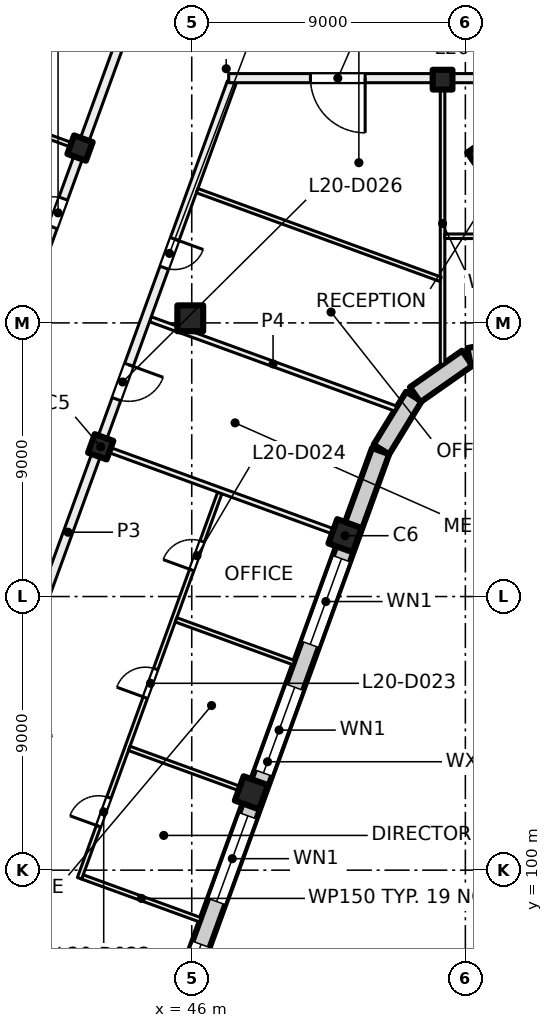
"""IFC4 building model, lengths in metres.
Left out: names, types, materials, properties, quantities, classifications, styles, units other than length and angle.
Written with IfcOpenShell. Run it as: python <this file> out.ifc"""

import sys

from ifc_helpers import new_model, si_unit, direction, frame, frame_2d, origin, origin_2d, place, context, subcontext, project, spatial, rectangle, hollow_rectangle, extrude, element, fill, save


model = new_model("IFC4")
c1 = context("Model", 3, precision=1e-05, world=origin(), true_north=direction((0.0, 1.0)))
c2 = subcontext(c1, "Body", "Model", "MODEL_VIEW")
j1 = project(units=[si_unit("LENGTHUNIT", "METRE"), si_unit("PLANEANGLEUNIT", "RADIAN")], contexts=[c1])
p1 = place(None, origin())
s1 = spatial("IfcSite", under=j1, at=p1, CompositionType="ELEMENT")
p2 = place(p1, origin())
s2 = spatial("IfcBuilding", under=s1, at=p2, CompositionType="ELEMENT")
p3 = place(p2, frame((0.0, 0.0, 89.0)))
s3 = spatial("IfcBuildingStorey", under=s2, at=p3, CompositionType="ELEMENT", Elevation=89.0)
p4 = place(p3, frame((56.036, 123.43, 0.0), z_axis=(0.0, 0.0, 1.0), x_axis=(0.573576436351, -0.819152044289, 0.0)))
e1 = element("IfcColumn", 1, at=p4, inside=s3, PredefinedType="COLUMN", context=c2, shape_type="SweptSolid", body=[
    extrude(hollow_rectangle(XDim=1.4, YDim=1.4, WallThickness=0.04, at=origin_2d()), origin(), (0.0, 0.0, 1.0), 4.0),
])
p5 = place(p3, frame((54.25, 126.0, 0.0), z_axis=(0.0, 0.0, 1.0), x_axis=(1.0, 0.0, 0.0)))
e2 = element("IfcColumn", 2, at=p5, inside=s3, PredefinedType="COLUMN", context=c2, shape_type="SweptSolid", body=[
    extrude(rectangle(XDim=0.65, YDim=0.65, at=origin_2d()), origin(), (0.0, 0.0, 1.0), 4.0),
])
p6 = place(p3, frame((45.952, 118.152, 0.0), z_axis=(0.0, 0.0, 1.0), x_axis=(1.0, 0.0, 0.0)))
e3 = element("IfcColumn", 3, at=p6, inside=s3, PredefinedType="COLUMN", context=c2, shape_type="SweptSolid", body=[
    extrude(rectangle(XDim=0.85, YDim=0.85, at=origin_2d()), origin(), (0.0, 0.0, 1.0), 4.0),
])
for number, where, z_axis, x_axis in (
    (4, (43.006, 113.925, 0.0), (0.0, 0.0, 1.0), (-0.342, -0.94, 0.0)),
    (5, (42.325, 123.751, 0.0), (0.0, 0.0, 1.0), (-0.342, -0.94, 0.0)),
):
    element("IfcColumn", number, at=place(p3, frame(where, z_axis=z_axis, x_axis=x_axis)), inside=s3, PredefinedType="COLUMN", context=c2, shape_type="SweptSolid", body=[
        extrude(rectangle(XDim=0.65, YDim=0.65, at=origin_2d()), origin(), (0.0, 0.0, 1.0), 4.0),
    ])
for number, where, z_axis, x_axis in (
    (6, (51.04, 111.001, 0.0), (0.0, 0.0, 1.0), (-0.342, -0.94, 0.0)),
    (7, (47.962, 102.544, 0.0), (0.0, 0.0, 1.0), (-0.342, -0.94, 0.0)),
):
    element("IfcColumn", number, at=place(p3, frame(where, z_axis=z_axis, x_axis=x_axis)), inside=s3, PredefinedType="COLUMN", context=c2, shape_type="SweptSolid", body=[
        extrude(rectangle(XDim=0.85, YDim=0.85, at=origin_2d()), origin(), (0.0, 0.0, 1.0), 4.0),
    ])
p7 = place(p3, frame((52.212, 113.783, 0.0), z_axis=(0.0, 0.0, 1.0), x_axis=(-0.34202521188, -0.939690775968, 0.0)))
e8 = element("IfcWall", 8, at=p7, inside=s3, PredefinedType="SOLIDWALL", context=c2, shape_type="SweptSolid", body=[
    extrude(rectangle(XDim=21.745, YDim=0.6, at=frame_2d((10.873, 0.0))), origin(), (0.0, 0.0, 1.0), 3.625),
])
p8 = place(p7, frame((3.765, 0.0, 0.9)))
e9 = element("IfcOpeningElement", 9, at=p8, cuts=e8, PredefinedType="OPENING", context=c2, shape_type="SweptSolid", body=[
    extrude(rectangle(XDim=3.0, YDim=2.4, at=frame_2d((1.5, 1.2))), frame((0.0, 0.31, 0.0), z_axis=(0.0, -1.0, 0.0), x_axis=(1.0, 0.0, 0.0)), (0.0, 0.0, 1.0), 0.62),
])
p9 = place(p7, frame((8.265, 0.0, 0.9)))
e10 = element("IfcOpeningElement", 10, at=p9, cuts=e8, PredefinedType="OPENING", context=c2, shape_type="SweptSolid", body=[
    extrude(rectangle(XDim=3.0, YDim=2.4, at=frame_2d((1.5, 1.2))), frame((0.0, 0.31, 0.0), z_axis=(0.0, -1.0, 0.0), x_axis=(1.0, 0.0, 0.0)), (0.0, 0.0, 1.0), 0.62),
])
p10 = place(p7, frame((12.765, 0.0, 0.9)))
e11 = element("IfcOpeningElement", 11, at=p10, cuts=e8, PredefinedType="OPENING", context=c2, shape_type="SweptSolid", body=[
    extrude(rectangle(XDim=3.0, YDim=2.4, at=frame_2d((1.5, 1.2))), frame((0.0, 0.31, 0.0), z_axis=(0.0, -1.0, 0.0), x_axis=(1.0, 0.0, 0.0)), (0.0, 0.0, 1.0), 0.62),
])
p11 = place(p7, frame((17.265, 0.0, 0.9)))
e12 = element("IfcOpeningElement", 12, at=p11, cuts=e8, PredefinedType="OPENING", context=c2, shape_type="SweptSolid", body=[
    extrude(rectangle(XDim=3.0, YDim=2.4, at=frame_2d((1.5, 1.2))), frame((0.0, 0.31, 0.0), z_axis=(0.0, -1.0, 0.0), x_axis=(1.0, 0.0, 0.0)), (0.0, 0.0, 1.0), 0.62),
])
p12 = place(p3, frame((53.305, 115.578, 0.0), z_axis=(0.0, 0.0, 1.0), x_axis=(-0.522402266438, -0.852699168535, 0.0)))
e13 = element("IfcWall", 13, at=p12, inside=s3, PredefinedType="SOLIDWALL", context=c2, shape_type="SweptSolid", body=[
    extrude(rectangle(XDim=2.042, YDim=0.6, at=frame_2d((1.021, 0.0))), origin(), (0.0, 0.0, 1.0), 3.625),
])
for number, where, z_axis, x_axis in (
    (14, (55.062, 116.839, 0.0), (0.0, 0.0, 1.0), (-0.819, -0.574, 0.0)),
    (15, (57.175, 117.294, 0.0), (0.0, 0.0, 1.0), (-0.98, -0.199, 0.0)),
):
    element("IfcWall", number, at=place(p3, frame(where, z_axis=z_axis, x_axis=x_axis)), inside=s3, PredefinedType="SOLIDWALL", context=c2, shape_type="SweptSolid", body=[
        extrude(rectangle(XDim=2.092, YDim=0.6, at=frame_2d((1.046, 0.0))), origin(), (0.0, 0.0, 1.0), 3.625),
    ])
p13 = place(p3, frame((32.881, 97.657, 0.0), z_axis=(0.0, 0.0, 1.0), x_axis=(0.342017360004, 0.939693633828, 0.0)))
e16 = element("IfcWall", 16, at=p13, inside=s3, PredefinedType="PARTITIONING", context=c2, shape_type="SweptSolid", body=[
    extrude(rectangle(XDim=34.516, YDim=0.3, at=frame_2d((17.258, 0.0))), origin(), (0.0, 0.0, 1.0), 3.625),
])
p14 = place(p13, frame((4.275, 0.0, 0.0)))
e17 = element("IfcOpeningElement", 17, at=p14, cuts=e16, PredefinedType="OPENING", context=c2, shape_type="SweptSolid", body=[
    extrude(rectangle(XDim=1.2, YDim=2.1, at=frame_2d((0.6, 1.05))), frame((0.0, 0.16, 0.0), z_axis=(0.0, -1.0, 0.0), x_axis=(1.0, 0.0, 0.0)), (0.0, 0.0, 1.0), 0.32),
])
p15 = place(p13, frame((10.75, 0.0, 0.0)))
e18 = element("IfcOpeningElement", 18, at=p15, cuts=e16, PredefinedType="OPENING", context=c2, shape_type="SweptSolid", body=[
    extrude(rectangle(XDim=1.0, YDim=2.1, at=frame_2d((0.5, 1.05))), frame((0.0, 0.16, 0.0), z_axis=(0.0, -1.0, 0.0), x_axis=(1.0, 0.0, 0.0)), (0.0, 0.0, 1.0), 0.32),
])
p16 = place(p13, frame((15.25, 0.0, 0.0)))
e19 = element("IfcOpeningElement", 19, at=p16, cuts=e16, PredefinedType="OPENING", context=c2, shape_type="SweptSolid", body=[
    extrude(rectangle(XDim=1.0, YDim=2.1, at=frame_2d((0.5, 1.05))), frame((0.0, 0.16, 0.0), z_axis=(0.0, -1.0, 0.0), x_axis=(1.0, 0.0, 0.0)), (0.0, 0.0, 1.0), 0.32),
])
p17 = place(p13, frame((20.4, 0.0, 0.0)))
e20 = element("IfcOpeningElement", 20, at=p17, cuts=e16, PredefinedType="OPENING", context=c2, shape_type="SweptSolid", body=[
    extrude(rectangle(XDim=1.2, YDim=2.1, at=frame_2d((0.6, 1.05))), frame((0.0, 0.16, 0.0), z_axis=(0.0, -1.0, 0.0), x_axis=(1.0, 0.0, 0.0)), (0.0, 0.0, 1.0), 0.32),
])
p18 = place(p13, frame((25.0, 0.0, 0.0)))
e21 = element("IfcOpeningElement", 21, at=p18, cuts=e16, PredefinedType="OPENING", context=c2, shape_type="SweptSolid", body=[
    extrude(rectangle(XDim=1.0, YDim=2.1, at=frame_2d((0.5, 1.05))), frame((0.0, 0.16, 0.0), z_axis=(0.0, -1.0, 0.0), x_axis=(1.0, 0.0, 0.0)), (0.0, 0.0, 1.0), 0.32),
])
p19 = place(p3, frame((46.282, 98.367, 0.0), z_axis=(0.0, 0.0, 1.0), x_axis=(-0.939765774653, 0.341819087808, 0.0)))
e22 = element("IfcWall", 22, at=p19, inside=s3, PredefinedType="PARTITIONING", context=c2, shape_type="SweptSolid", body=[
    extrude(rectangle(XDim=4.125, YDim=0.15, at=frame_2d((2.063, 0.0))), origin(), (0.0, 0.0, 1.0), 3.625),
])
p20 = place(p3, frame((42.309, 99.733, 0.0), z_axis=(0.0, 0.0, 1.0), x_axis=(0.342023551531, 0.939691380293, 0.0)))
e23 = element("IfcWall", 23, at=p20, inside=s3, PredefinedType="PARTITIONING", context=c2, shape_type="SweptSolid", body=[
    extrude(rectangle(XDim=13.488, YDim=0.15, at=frame_2d((6.744, 0.0))), origin(), (0.0, 0.0, 1.0), 3.625),
])
p21 = place(p20, frame((1.825, 0.0, 0.0)))
e24 = element("IfcOpeningElement", 24, at=p21, cuts=e23, PredefinedType="OPENING", context=c2, shape_type="SweptSolid", body=[
    extrude(rectangle(XDim=1.0, YDim=2.1, at=frame_2d((0.5, 1.05))), frame((0.0, 0.085, 0.0), z_axis=(0.0, -1.0, 0.0), x_axis=(1.0, 0.0, 0.0)), (0.0, 0.0, 1.0), 0.17),
])
p22 = place(p20, frame((6.325, 0.0, 0.0)))
e25 = element("IfcOpeningElement", 25, at=p22, cuts=e23, PredefinedType="OPENING", context=c2, shape_type="SweptSolid", body=[
    extrude(rectangle(XDim=1.0, YDim=2.1, at=frame_2d((0.5, 1.05))), frame((0.0, 0.085, 0.0), z_axis=(0.0, -1.0, 0.0), x_axis=(1.0, 0.0, 0.0)), (0.0, 0.0, 1.0), 0.17),
])
p23 = place(p20, frame((10.791, 0.0, 0.0)))
e26 = element("IfcOpeningElement", 26, at=p23, cuts=e23, PredefinedType="OPENING", context=c2, shape_type="SweptSolid", body=[
    extrude(rectangle(XDim=1.0, YDim=2.1, at=frame_2d((0.5, 1.05))), frame((0.0, 0.085, 0.0), z_axis=(0.0, -1.0, 0.0), x_axis=(1.0, 0.0, 0.0)), (0.0, 0.0, 1.0), 0.17),
])
p24 = place(p3, frame((42.231, 123.785, 0.0), z_axis=(0.0, 0.0, 1.0), x_axis=(-0.939687752599, 0.342033518263, 0.0)))
e27 = element("IfcWall", 27, at=p24, inside=s3, PredefinedType="PARTITIONING", context=c2, shape_type="SweptSolid", body=[
    extrude(rectangle(XDim=8.301, YDim=0.15, at=frame_2d((4.15, 0.0))), origin(), (0.0, 0.0, 1.0), 3.625),
])
p25 = place(p3, frame((43.1, 113.891, 0.0), z_axis=(0.0, 0.0, 1.0), x_axis=(0.939670544866, -0.342080790328, 0.0)))
e28 = element("IfcWall", 28, at=p25, inside=s3, PredefinedType="PARTITIONING", context=c2, shape_type="SweptSolid", body=[
    extrude(rectangle(XDim=8.3, YDim=0.175, at=frame_2d((4.15, 0.0))), origin(), (0.0, 0.0, 1.0), 3.625),
])
p26 = place(p3, frame((43.944, 104.006, 0.0), z_axis=(0.0, 0.0, 1.0), x_axis=(0.939689717042, -0.34202812119, 0.0)))
e29 = element("IfcWall", 29, at=p26, inside=s3, PredefinedType="PARTITIONING", context=c2, shape_type="SweptSolid", body=[
    extrude(rectangle(XDim=4.126, YDim=0.15, at=frame_2d((2.063, 0.0))), origin(), (0.0, 0.0, 1.0), 3.625),
])
p27 = place(p3, frame((44.639, 118.12, 0.0), z_axis=(0.0, 0.0, 1.0), x_axis=(0.939669707102, -0.342083091593, 0.0)))
e30 = element("IfcWall", 30, at=p27, inside=s3, PredefinedType="PARTITIONING", context=c2, shape_type="SweptSolid", body=[
    extrude(rectangle(XDim=8.589, YDim=0.175, at=frame_2d((4.295, 0.0))), origin(), (0.0, 0.0, 1.0), 3.625),
])
p28 = place(p3, frame((45.483, 108.234, 0.0), z_axis=(0.0, 0.0, 1.0), x_axis=(0.939791695678, -0.341747814529, 0.0)))
e31 = element("IfcWall", 31, at=p28, inside=s3, PredefinedType="PARTITIONING", context=c2, shape_type="SweptSolid", body=[
    extrude(rectangle(XDim=4.125, YDim=0.15, at=frame_2d((2.063, 0.0))), origin(), (0.0, 0.0, 1.0), 3.625),
])
p29 = place(p3, frame((47.314, 125.909, 0.0), z_axis=(0.0, 0.0, 1.0), x_axis=(-0.342010770371, -0.939696032209, 0.0)))
e32 = element("IfcWall", 32, at=p29, inside=s3, PredefinedType="PARTITIONING", context=c2, shape_type="SweptSolid", body=[
    extrude(rectangle(XDim=31.485, YDim=0.3, at=frame_2d((15.742, 0.0))), origin(), (0.0, 0.0, 1.0), 3.625),
])
p30 = place(p29, frame((22.21, 0.0, 0.0)))
e33 = element("IfcOpeningElement", 33, at=p30, cuts=e32, PredefinedType="OPENING", context=c2, shape_type="SweptSolid", body=[
    extrude(rectangle(XDim=1.8, YDim=2.1, at=frame_2d((0.9, 1.05))), frame((0.0, 0.16, 0.0), z_axis=(0.0, -1.0, 0.0), x_axis=(1.0, 0.0, 0.0)), (0.0, 0.0, 1.0), 0.32),
])
p31 = place(p29, frame((9.885, 0.0, 0.0)))
e34 = element("IfcOpeningElement", 34, at=p31, cuts=e32, PredefinedType="OPENING", context=c2, shape_type="SweptSolid", body=[
    extrude(rectangle(XDim=1.2, YDim=2.1, at=frame_2d((0.6, 1.05))), frame((0.0, 0.16, 0.0), z_axis=(0.0, -1.0, 0.0), x_axis=(1.0, 0.0, 0.0)), (0.0, 0.0, 1.0), 0.32),
])
p32 = place(p29, frame((5.484, 0.0, 0.0)))
e35 = element("IfcOpeningElement", 35, at=p32, cuts=e32, PredefinedType="OPENING", context=c2, shape_type="SweptSolid", body=[
    extrude(rectangle(XDim=1.0, YDim=2.1, at=frame_2d((0.5, 1.05))), frame((0.0, 0.16, 0.0), z_axis=(0.0, -1.0, 0.0), x_axis=(1.0, 0.0, 0.0)), (0.0, 0.0, 1.0), 0.32),
])
p33 = place(p3, frame((54.25, 116.637, 0.0), z_axis=(0.0, 0.0, 1.0), x_axis=(0.0, 1.0, 0.0)))
e36 = element("IfcWall", 36, at=p33, inside=s3, PredefinedType="PARTITIONING", context=c2, shape_type="SweptSolid", body=[
    extrude(rectangle(XDim=9.263, YDim=0.15, at=frame_2d((4.631, 0.0))), origin(), (0.0, 0.0, 1.0), 3.625),
])
p34 = place(p3, frame((54.18, 119.436, 0.0), z_axis=(0.0, 0.0, 1.0), x_axis=(-0.939669476286, 0.342083725624, 0.0)))
e37 = element("IfcWall", 37, at=p34, inside=s3, PredefinedType="PARTITIONING", context=c2, shape_type="SweptSolid", body=[
    extrude(rectangle(XDim=8.516, YDim=0.15, at=frame_2d((4.258, 0.0))), origin(), (0.0, 0.0, 1.0), 3.625),
])
p35 = place(p3, frame((54.325, 120.85, 0.0), z_axis=(0.0, 0.0, 1.0), x_axis=(1.0, 0.0, 0.0)))
e38 = element("IfcWall", 38, at=p35, inside=s3, PredefinedType="PARTITIONING", context=c2, shape_type="SweptSolid", body=[
    extrude(rectangle(XDim=4.35, YDim=0.15, at=frame_2d((2.175, 0.0))), origin(), (0.0, 0.0, 1.0), 3.625),
])
p36 = place(p3, frame((91.0, 126.05, 0.0), z_axis=(0.0, 0.0, 1.0), x_axis=(-1.0, 0.0, 0.0)))
e39 = element("IfcWall", 39, at=p36, inside=s3, PredefinedType="PARTITIONING", context=c2, shape_type="SweptSolid", body=[
    extrude(rectangle(XDim=43.785, YDim=0.3, at=frame_2d((21.893, 0.0))), origin(), (0.0, 0.0, 1.0), 3.625),
])
p37 = place(p36, frame((2.025, 0.0, 0.0)))
e40 = element("IfcOpeningElement", 40, at=p37, cuts=e39, PredefinedType="OPENING", context=c2, shape_type="SweptSolid", body=[
    extrude(rectangle(XDim=1.2, YDim=2.1, at=frame_2d((0.6, 1.05))), frame((0.0, 0.16, 0.0), z_axis=(0.0, -1.0, 0.0), x_axis=(1.0, 0.0, 0.0)), (0.0, 0.0, 1.0), 0.32),
])
p38 = place(p36, frame((6.9, 0.0, 0.0)))
e41 = element("IfcOpeningElement", 41, at=p38, cuts=e39, PredefinedType="OPENING", context=c2, shape_type="SweptSolid", body=[
    extrude(rectangle(XDim=1.2, YDim=2.1, at=frame_2d((0.6, 1.05))), frame((0.0, 0.16, 0.0), z_axis=(0.0, -1.0, 0.0), x_axis=(1.0, 0.0, 0.0)), (0.0, 0.0, 1.0), 0.32),
])
p39 = place(p36, frame((11.4, 0.0, 0.0)))
e42 = element("IfcOpeningElement", 42, at=p39, cuts=e39, PredefinedType="OPENING", context=c2, shape_type="SweptSolid", body=[
    extrude(rectangle(XDim=1.2, YDim=2.1, at=frame_2d((0.6, 1.05))), frame((0.0, 0.16, 0.0), z_axis=(0.0, -1.0, 0.0), x_axis=(1.0, 0.0, 0.0)), (0.0, 0.0, 1.0), 0.32),
])
p40 = place(p36, frame((15.25, 0.0, 0.0)))
e43 = element("IfcOpeningElement", 43, at=p40, cuts=e39, PredefinedType="OPENING", context=c2, shape_type="SweptSolid", body=[
    extrude(rectangle(XDim=1.0, YDim=2.1, at=frame_2d((0.5, 1.05))), frame((0.0, 0.16, 0.0), z_axis=(0.0, -1.0, 0.0), x_axis=(1.0, 0.0, 0.0)), (0.0, 0.0, 1.0), 0.32),
])
p41 = place(p36, frame((19.9, 0.0, 0.0)))
e44 = element("IfcOpeningElement", 44, at=p41, cuts=e39, PredefinedType="OPENING", context=c2, shape_type="SweptSolid", body=[
    extrude(rectangle(XDim=1.2, YDim=2.1, at=frame_2d((0.6, 1.05))), frame((0.0, 0.16, 0.0), z_axis=(0.0, -1.0, 0.0), x_axis=(1.0, 0.0, 0.0)), (0.0, 0.0, 1.0), 0.32),
])
p42 = place(p36, frame((23.85, 0.0, 0.0)))
e45 = element("IfcOpeningElement", 45, at=p42, cuts=e39, PredefinedType="OPENING", context=c2, shape_type="SweptSolid", body=[
    extrude(rectangle(XDim=1.8, YDim=2.1, at=frame_2d((0.9, 1.05))), frame((0.0, 0.16, 0.0), z_axis=(0.0, -1.0, 0.0), x_axis=(1.0, 0.0, 0.0)), (0.0, 0.0, 1.0), 0.32),
])
p43 = place(p36, frame((34.0, 0.0, 0.0)))
e46 = element("IfcOpeningElement", 46, at=p43, cuts=e39, PredefinedType="OPENING", context=c2, shape_type="SweptSolid", body=[
    extrude(rectangle(XDim=1.0, YDim=2.1, at=frame_2d((0.5, 1.05))), frame((0.0, 0.16, 0.0), z_axis=(0.0, -1.0, 0.0), x_axis=(1.0, 0.0, 0.0)), (0.0, 0.0, 1.0), 0.32),
])
p44 = place(p36, frame((39.296, 0.0, 0.0)))
e47 = element("IfcOpeningElement", 47, at=p44, cuts=e39, PredefinedType="OPENING", context=c2, shape_type="SweptSolid", body=[
    extrude(rectangle(XDim=1.8, YDim=2.1, at=frame_2d((0.9, 1.05))), frame((0.0, 0.16, 0.0), z_axis=(0.0, -1.0, 0.0), x_axis=(1.0, 0.0, 0.0)), (0.0, 0.0, 1.0), 0.32),
])
p45 = place(p8, origin())
e48 = element("IfcWindow", 48, at=p45, inside=s3, PartitioningType="SINGLE_PANEL", PredefinedType="WINDOW", context=c2, shape_type="SweptSolid", body=[
    extrude(rectangle(XDim=3.0, YDim=2.4, at=frame_2d((1.5, 1.2))), frame((0.0, 0.03, 0.0), z_axis=(0.0, -1.0, 0.0), x_axis=(1.0, 0.0, 0.0)), (0.0, 0.0, 1.0), 0.06),
])
fill(e9, e48)
p46 = place(p9, origin())
e49 = element("IfcWindow", 49, at=p46, inside=s3, PartitioningType="SINGLE_PANEL", PredefinedType="WINDOW", context=c2, shape_type="SweptSolid", body=[
    extrude(rectangle(XDim=3.0, YDim=2.4, at=frame_2d((1.5, 1.2))), frame((0.0, 0.03, 0.0), z_axis=(0.0, -1.0, 0.0), x_axis=(1.0, 0.0, 0.0)), (0.0, 0.0, 1.0), 0.06),
])
fill(e10, e49)
p47 = place(p10, origin())
e50 = element("IfcWindow", 50, at=p47, inside=s3, PartitioningType="SINGLE_PANEL", PredefinedType="WINDOW", context=c2, shape_type="SweptSolid", body=[
    extrude(rectangle(XDim=3.0, YDim=2.4, at=frame_2d((1.5, 1.2))), frame((0.0, 0.03, 0.0), z_axis=(0.0, -1.0, 0.0), x_axis=(1.0, 0.0, 0.0)), (0.0, 0.0, 1.0), 0.06),
])
fill(e11, e50)
p48 = place(p11, origin())
e51 = element("IfcWindow", 51, at=p48, inside=s3, PartitioningType="SINGLE_PANEL", PredefinedType="WINDOW", context=c2, shape_type="SweptSolid", body=[
    extrude(rectangle(XDim=3.0, YDim=2.4, at=frame_2d((1.5, 1.2))), frame((0.0, 0.03, 0.0), z_axis=(0.0, -1.0, 0.0), x_axis=(1.0, 0.0, 0.0)), (0.0, 0.0, 1.0), 0.06),
])
fill(e12, e51)
p49 = place(p18, origin())
e52 = element("IfcDoor", 52, at=p49, inside=s3, OperationType="SINGLE_SWING_RIGHT", PredefinedType="DOOR", context=c2, shape_type="SweptSolid", body=[
    extrude(rectangle(XDim=1.0, YDim=2.1, at=frame_2d((0.5, 1.05))), frame((0.0, 0.025, 0.0), z_axis=(0.0, -1.0, 0.0), x_axis=(1.0, 0.0, 0.0)), (0.0, 0.0, 1.0), 0.05),
])
fill(e21, e52)
p50 = place(p21, origin())
e53 = element("IfcDoor", 53, at=p50, inside=s3, OperationType="SINGLE_SWING_LEFT", PredefinedType="DOOR", context=c2, shape_type="SweptSolid", body=[
    extrude(rectangle(XDim=1.0, YDim=2.1, at=frame_2d((0.5, 1.05))), frame((0.0, 0.025, 0.0), z_axis=(0.0, -1.0, 0.0), x_axis=(1.0, 0.0, 0.0)), (0.0, 0.0, 1.0), 0.05),
])
fill(e24, e53)
p51 = place(p22, origin())
e54 = element("IfcDoor", 54, at=p51, inside=s3, OperationType="SINGLE_SWING_LEFT", PredefinedType="DOOR", context=c2, shape_type="SweptSolid", body=[
    extrude(rectangle(XDim=1.0, YDim=2.1, at=frame_2d((0.5, 1.05))), frame((0.0, 0.025, 0.0), z_axis=(0.0, -1.0, 0.0), x_axis=(1.0, 0.0, 0.0)), (0.0, 0.0, 1.0), 0.05),
])
fill(e25, e54)
p52 = place(p23, origin())
e55 = element("IfcDoor", 55, at=p52, inside=s3, OperationType="SINGLE_SWING_LEFT", PredefinedType="DOOR", context=c2, shape_type="SweptSolid", body=[
    extrude(rectangle(XDim=1.0, YDim=2.1, at=frame_2d((0.5, 1.05))), frame((0.0, 0.025, 0.0), z_axis=(0.0, -1.0, 0.0), x_axis=(1.0, 0.0, 0.0)), (0.0, 0.0, 1.0), 0.05),
])
fill(e26, e55)
p53 = place(p31, origin())
e56 = element("IfcDoor", 56, at=p53, inside=s3, OperationType="DOUBLE_DOOR_SINGLE_SWING", PredefinedType="DOOR", context=c2, shape_type="SweptSolid", body=[
    extrude(rectangle(XDim=1.2, YDim=2.1, at=frame_2d((0.6, 1.05))), frame((0.0, 0.025, 0.0), z_axis=(0.0, -1.0, 0.0), x_axis=(1.0, 0.0, 0.0)), (0.0, 0.0, 1.0), 0.05),
])
fill(e34, e56)
p54 = place(p32, origin())
e57 = element("IfcDoor", 57, at=p54, inside=s3, OperationType="SINGLE_SWING_LEFT", PredefinedType="DOOR", context=c2, shape_type="SweptSolid", body=[
    extrude(rectangle(XDim=1.0, YDim=2.1, at=frame_2d((0.5, 1.05))), frame((0.0, 0.025, 0.0), z_axis=(0.0, -1.0, 0.0), x_axis=(1.0, 0.0, 0.0)), (0.0, 0.0, 1.0), 0.05),
])
fill(e35, e57)
p55 = place(p44, origin())
e58 = element("IfcDoor", 58, at=p55, inside=s3, OperationType="DOUBLE_DOOR_SINGLE_SWING", PredefinedType="DOOR", context=c2, shape_type="SweptSolid", body=[
    extrude(rectangle(XDim=1.8, YDim=2.1, at=frame_2d((0.9, 1.05))), frame((0.0, 0.025, 0.0), z_axis=(0.0, -1.0, 0.0), x_axis=(1.0, 0.0, 0.0)), (0.0, 0.0, 1.0), 0.05),
])
fill(e47, e58)
save(model, sys.argv[1])
